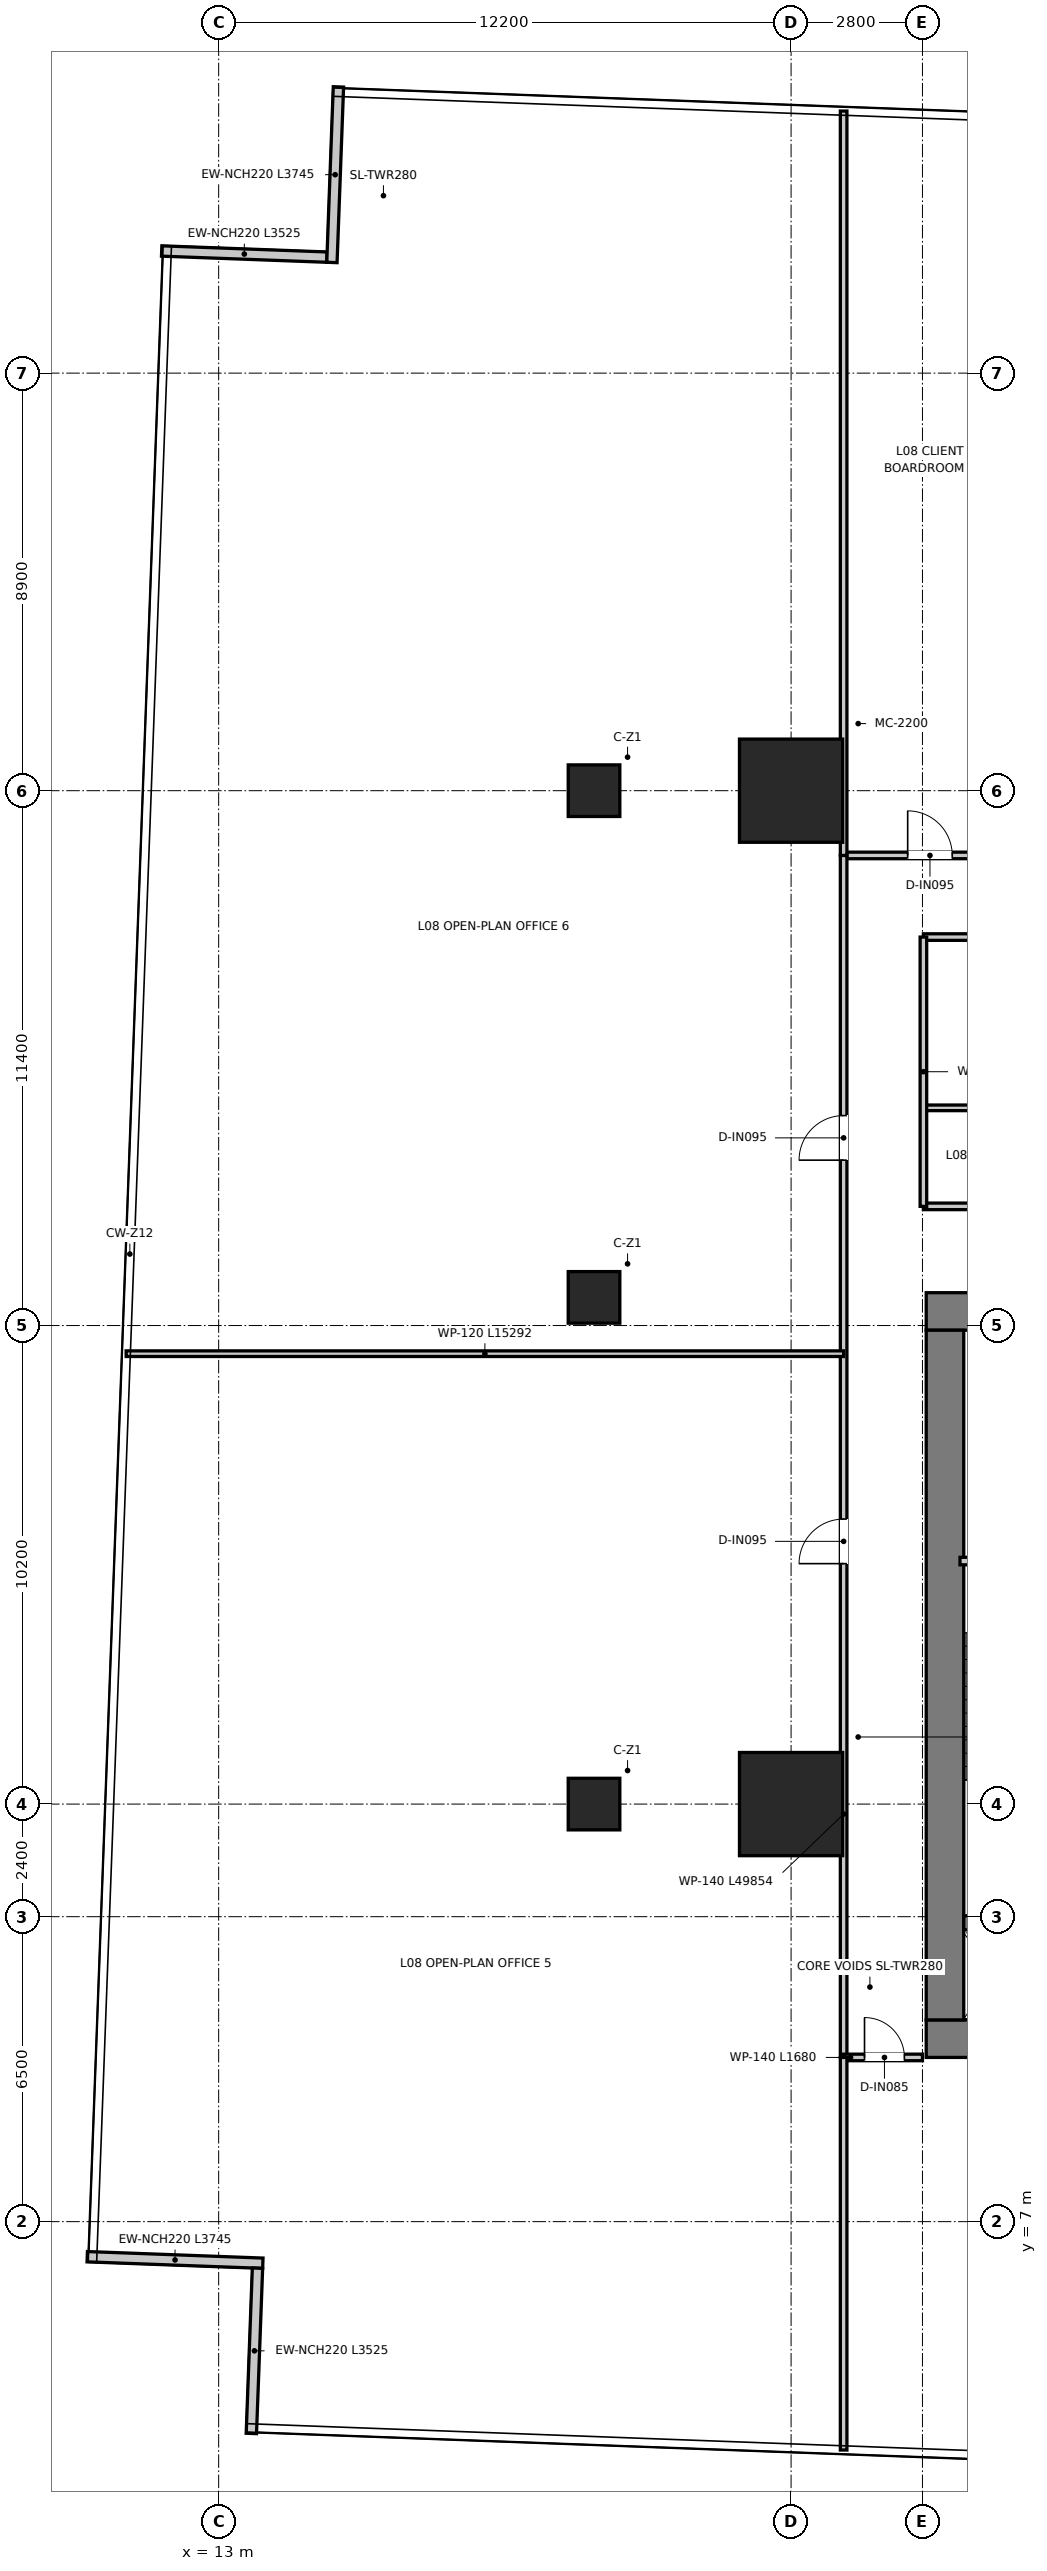
"""IFC4 building model, lengths in metres.
Left out: names, types, materials, properties, quantities, classifications, styles, units other than length and angle.
Written with IfcOpenShell. Run it as: python <this file> out.ifc"""

import sys

from ifc_helpers import new_model, si_unit, direction, frame, frame_2d, origin, origin_2d, place, context, subcontext, project, spatial, rectangle, extrude, source, transform, mapped, element, fill, save


model = new_model("IFC4")
c1 = context("Model", 3, precision=1e-05, world=origin(), true_north=direction((0.0, 1.0)))
c2 = subcontext(c1, "Body", "Model", "MODEL_VIEW")
j1 = project(units=[si_unit("LENGTHUNIT", "METRE"), si_unit("PLANEANGLEUNIT", "RADIAN")], contexts=[c1])
p1 = place(None, origin())
s1 = spatial("IfcSite", under=j1, at=p1, CompositionType="ELEMENT")
p2 = place(p1, origin())
s2 = spatial("IfcBuilding", under=s1, at=p2, CompositionType="ELEMENT")
p3 = place(p2, frame((0.0, 0.0, 36.85)))
s3 = spatial("IfcBuildingStorey", under=s2, at=p3, CompositionType="ELEMENT", Elevation=36.85)
p4 = place(p3, frame((28.08, 10.9, 0.0), z_axis=(0.0, 0.0, 1.0), x_axis=(1.0, 0.0, 0.0)))
e1 = element("IfcWall", 1, at=p4, inside=s3, PredefinedType="SHEAR", context=c2, shape_type="SweptSolid", body=[
    extrude(rectangle(XDim=15.84, YDim=0.8, at=frame_2d((7.92, 0.0))), origin(), (0.0, 0.0, 1.0), 3.95),
])
p5 = place(p3, frame((28.08, 26.4, 0.0), z_axis=(0.0, 0.0, 1.0), x_axis=(1.0, 0.0, 0.0)))
e2 = element("IfcWall", 2, at=p5, inside=s3, PredefinedType="SHEAR", context=c2, shape_type="SweptSolid", body=[
    extrude(rectangle(XDim=15.84, YDim=0.8, at=frame_2d((7.92, 0.0))), origin(), (0.0, 0.0, 1.0), 3.95),
])
p6 = place(p5, frame((7.22, 0.0, 0.0)))
e3 = element("IfcOpeningElement", 3, at=p6, cuts=e2, PredefinedType="OPENING", context=c2, shape_type="SweptSolid", body=[
    extrude(rectangle(XDim=1.4, YDim=2.2, at=frame_2d((0.7, 1.1))), frame((0.0, 0.41, 0.0), z_axis=(0.0, -1.0, 0.0), x_axis=(1.0, 0.0, 0.0)), (0.0, 0.0, 1.0), 0.82),
])
p7 = place(p5, frame((1.775, 0.0, 0.0)))
e4 = element("IfcOpeningElement", 4, at=p7, cuts=e2, PredefinedType="OPENING", context=c2, shape_type="SweptSolid", body=[
    extrude(rectangle(XDim=1.05, YDim=2.1, at=frame_2d((0.525, 1.05))), frame((0.0, 0.41, 0.0), z_axis=(0.0, -1.0, 0.0), x_axis=(1.0, 0.0, 0.0)), (0.0, 0.0, 1.0), 0.82),
])
p8 = place(p5, frame((13.015, 0.0, 0.0)))
e5 = element("IfcOpeningElement", 5, at=p8, cuts=e2, PredefinedType="OPENING", context=c2, shape_type="SweptSolid", body=[
    extrude(rectangle(XDim=1.05, YDim=2.1, at=frame_2d((0.525, 1.05))), frame((0.0, 0.41, 0.0), z_axis=(0.0, -1.0, 0.0), x_axis=(1.0, 0.0, 0.0)), (0.0, 0.0, 1.0), 0.82),
])
p9 = place(p3, frame((28.48, 11.3, 0.0), z_axis=(0.0, 0.0, 1.0), x_axis=(0.0, 1.0, 0.0)))
e6 = element("IfcWall", 6, at=p9, inside=s3, PredefinedType="SHEAR", context=c2, shape_type="SweptSolid", body=[
    extrude(rectangle(XDim=14.7, YDim=0.8, at=frame_2d((7.35, 0.0))), origin(), (0.0, 0.0, 1.0), 3.95),
])
p10 = place(p3, frame((28.88, 13.37, 0.0), z_axis=(0.0, 0.0, 1.0), x_axis=(1.0, 0.0, 0.0)))
e7 = element("IfcWall", 7, at=p10, inside=s3, PredefinedType="SHEAR", context=c2, shape_type="SweptSolid", body=[
    extrude(rectangle(XDim=3.1, YDim=0.3, at=frame_2d((1.55, 0.0))), origin(), (0.0, 0.0, 1.0), 3.95),
])
m1 = source(origin(), c2, "Body", "SweptSolid", [
    extrude(rectangle(XDim=2.2, YDim=2.2, at=origin_2d()), origin(), (0.0, 0.0, 1.0), 3.95),
])
for number, where, z_axis, x_axis in (
    (8, (25.2, 15.9, 0.0), (0.0, 0.0, 1.0), (1.0, 0.0, 0.0)),
    (9, (25.2, 37.5, 0.0), (0.0, 0.0, 1.0), (1.0, 0.0, 0.0)),
):
    element("IfcColumn", number, at=place(p3, frame(where, z_axis=z_axis, x_axis=x_axis)), inside=s3, PredefinedType="USERDEFINED", context=c2, shape_type="MappedRepresentation", body=[
        mapped(m1, transform((0.0, 0.0, 0.0), x_axis=(1.0, 0.0, 0.0), y_axis=(0.0, 1.0, 0.0), z_axis=(0.0, 0.0, 1.0), scale=1.0)),
    ])
m2 = source(origin(), c2, "Body", "SweptSolid", [
    extrude(rectangle(XDim=1.1, YDim=1.1, at=origin_2d()), origin(), (0.0, 0.0, 1.0), 3.95),
])
for number, where, z_axis, x_axis in (
    (10, (21.0, 15.9, 0.0), (0.0, 0.0, 1.0), (1.0, 0.0, 0.0)),
    (11, (21.0, 26.7, 0.0), (0.0, 0.0, 1.0), (1.0, 0.0, 0.0)),
    (12, (21.0, 37.5, 0.0), (0.0, 0.0, 1.0), (1.0, 0.0, 0.0)),
):
    element("IfcColumn", number, at=place(p3, frame(where, z_axis=z_axis, x_axis=x_axis)), inside=s3, PredefinedType="COLUMN", context=c2, shape_type="MappedRepresentation", body=[
        mapped(m2, transform((0.0, 0.0, 0.0), x_axis=(1.0, 0.0, 0.0), y_axis=(0.0, 1.0, 0.0), z_axis=(0.0, 0.0, 1.0), scale=1.0)),
    ])
p11 = place(p3, frame((15.308, 48.873, 0.0), z_axis=(0.0, 0.0, 1.0), x_axis=(-0.999313219865, 0.03705521019, 0.0)))
e13 = element("IfcWall", 13, at=p11, inside=s3, PredefinedType="ELEMENTEDWALL", context=c2, shape_type="SweptSolid", body=[
    extrude(rectangle(XDim=3.525, YDim=0.22, at=frame_2d((1.762, 0.0))), origin(), (0.0, 0.0, 1.0), 3.67),
])
p12 = place(p3, frame((10.199, 6.253, 0.0), z_axis=(0.0, 0.0, 1.0), x_axis=(0.999311794114, -0.037093640215, 0.0)))
e14 = element("IfcWall", 14, at=p12, inside=s3, PredefinedType="ELEMENTEDWALL", context=c2, shape_type="SweptSolid", body=[
    extrude(rectangle(XDim=3.745, YDim=0.22, at=frame_2d((1.873, 0.0))), origin(), (0.0, 0.0, 1.0), 3.67),
])
p13 = place(p3, frame((13.827, 6.008, 0.0), z_axis=(0.0, 0.0, 1.0), x_axis=(-0.03705521019, -0.999313219865, 0.0)))
e15 = element("IfcWall", 15, at=p13, inside=s3, PredefinedType="ELEMENTEDWALL", context=c2, shape_type="SweptSolid", body=[
    extrude(rectangle(XDim=3.525, YDim=0.22, at=frame_2d((1.762, 0.0))), origin(), (0.0, 0.0, 1.0), 3.67),
])
p14 = place(p3, frame((15.553, 52.501, 0.0), z_axis=(0.0, 0.0, 1.0), x_axis=(-0.037093640215, -0.999311794114, 0.0)))
e16 = element("IfcWall", 16, at=p14, inside=s3, PredefinedType="ELEMENTEDWALL", context=c2, shape_type="SweptSolid", body=[
    extrude(rectangle(XDim=3.745, YDim=0.22, at=frame_2d((1.873, 0.0))), origin(), (0.0, 0.0, 1.0), 3.67),
])
p15 = place(p3, frame((28.8, 21.08, 0.0), z_axis=(0.0, 0.0, 1.0), x_axis=(1.0, 0.0, 0.0)))
e17 = element("IfcWall", 17, at=p15, inside=s3, PredefinedType="PARTITIONING", context=c2, shape_type="SweptSolid", body=[
    extrude(rectangle(XDim=3.16, YDim=0.16, at=frame_2d((1.58, 0.0))), origin(), (0.0, 0.0, 1.0), 3.67),
])
p16 = place(p15, frame((1.055, 0.0, 0.0)))
e18 = element("IfcOpeningElement", 18, at=p16, cuts=e17, PredefinedType="OPENING", context=c2, shape_type="SweptSolid", body=[
    extrude(rectangle(XDim=1.05, YDim=2.1, at=frame_2d((0.525, 1.05))), frame((0.0, 0.09, 0.0), z_axis=(0.0, -1.0, 0.0), x_axis=(1.0, 0.0, 0.0)), (0.0, 0.0, 1.0), 0.18),
])
p17 = place(p3, frame((28.02, 28.64, 0.0), z_axis=(0.0, 0.0, 1.0), x_axis=(1.0, 0.0, 0.0)))
e19 = element("IfcWall", 19, at=p17, inside=s3, PredefinedType="PARTITIONING", context=c2, shape_type="SweptSolid", body=[
    extrude(rectangle(XDim=15.96, YDim=0.14, at=frame_2d((7.98, 0.0))), origin(), (0.0, 0.0, 1.0), 3.08),
])
p18 = place(p17, frame((7.455, 0.0, 0.0)))
e20 = element("IfcOpeningElement", 20, at=p18, cuts=e19, PredefinedType="OPENING", context=c2, shape_type="SweptSolid", body=[
    extrude(rectangle(XDim=1.05, YDim=2.15, at=frame_2d((0.525, 1.075))), frame((0.0, 0.08, 0.0), z_axis=(0.0, -1.0, 0.0), x_axis=(1.0, 0.0, 0.0)), (0.0, 0.0, 1.0), 0.16),
])
p19 = place(p3, frame((28.02, 30.74, 0.0), z_axis=(0.0, 0.0, 1.0), x_axis=(1.0, 0.0, 0.0)))
e21 = element("IfcWall", 21, at=p19, inside=s3, PredefinedType="PARTITIONING", context=c2, shape_type="SweptSolid", body=[
    extrude(rectangle(XDim=15.96, YDim=0.12, at=frame_2d((7.98, 0.0))), origin(), (0.0, 0.0, 1.0), 3.08),
])
p20 = place(p3, frame((28.02, 34.38, 0.0), z_axis=(0.0, 0.0, 1.0), x_axis=(1.0, 0.0, 0.0)))
e22 = element("IfcWall", 22, at=p20, inside=s3, PredefinedType="PARTITIONING", context=c2, shape_type="SweptSolid", body=[
    extrude(rectangle(XDim=15.96, YDim=0.14, at=frame_2d((7.98, 0.0))), origin(), (0.0, 0.0, 1.0), 3.08),
])
p21 = place(p20, frame((7.83, 0.0, 0.0)))
e23 = element("IfcOpeningElement", 23, at=p21, cuts=e22, PredefinedType="OPENING", context=c2, shape_type="SweptSolid", body=[
    extrude(rectangle(XDim=0.9, YDim=2.1, at=frame_2d((0.45, 1.05))), frame((0.0, 0.08, 0.0), z_axis=(0.0, -1.0, 0.0), x_axis=(1.0, 0.0, 0.0)), (0.0, 0.0, 1.0), 0.16),
])
p22 = place(p20, frame((11.03, 0.0, 0.0)))
e24 = element("IfcOpeningElement", 24, at=p22, cuts=e22, PredefinedType="OPENING", context=c2, shape_type="SweptSolid", body=[
    extrude(rectangle(XDim=0.9, YDim=2.1, at=frame_2d((0.45, 1.05))), frame((0.0, 0.08, 0.0), z_axis=(0.0, -1.0, 0.0), x_axis=(1.0, 0.0, 0.0)), (0.0, 0.0, 1.0), 0.16),
])
p23 = place(p20, frame((14.055, 0.0, 0.0)))
e25 = element("IfcOpeningElement", 25, at=p23, cuts=e22, PredefinedType="OPENING", context=c2, shape_type="SweptSolid", body=[
    extrude(rectangle(XDim=0.95, YDim=2.1, at=frame_2d((0.475, 1.05))), frame((0.0, 0.08, 0.0), z_axis=(0.0, -1.0, 0.0), x_axis=(1.0, 0.0, 0.0)), (0.0, 0.0, 1.0), 0.16),
])
p24 = place(p20, frame((2.855, 0.0, 0.0)))
e26 = element("IfcOpeningElement", 26, at=p24, cuts=e22, PredefinedType="OPENING", context=c2, shape_type="SweptSolid", body=[
    extrude(rectangle(XDim=0.95, YDim=2.1, at=frame_2d((0.475, 1.05))), frame((0.0, 0.08, 0.0), z_axis=(0.0, -1.0, 0.0), x_axis=(1.0, 0.0, 0.0)), (0.0, 0.0, 1.0), 0.16),
])
p25 = place(p3, frame((28.02, 28.64, 0.0), z_axis=(0.0, 0.0, 1.0), x_axis=(0.0, 1.0, 0.0)))
e27 = element("IfcWall", 27, at=p25, inside=s3, PredefinedType="PARTITIONING", context=c2, shape_type="SweptSolid", body=[
    extrude(rectangle(XDim=5.74, YDim=0.14, at=frame_2d((2.87, 0.0))), origin(), (0.0, 0.0, 1.0), 3.22),
])
p26 = place(p3, frame((26.32, 36.12, 0.0), z_axis=(0.0, 0.0, 1.0), x_axis=(1.0, 0.0, 0.0)))
e28 = element("IfcWall", 28, at=p26, inside=s3, PredefinedType="PARTITIONING", context=c2, shape_type="SweptSolid", body=[
    extrude(rectangle(XDim=19.36, YDim=0.14, at=frame_2d((9.68, 0.0))), origin(), (0.0, 0.0, 1.0), 3.08),
])
p27 = place(p26, frame((1.365, 0.0, 0.0)))
e29 = element("IfcOpeningElement", 29, at=p27, cuts=e28, PredefinedType="OPENING", context=c2, shape_type="SweptSolid", body=[
    extrude(rectangle(XDim=0.95, YDim=2.1, at=frame_2d((0.475, 1.05))), frame((0.0, 0.08, 0.0), z_axis=(0.0, -1.0, 0.0), x_axis=(1.0, 0.0, 0.0)), (0.0, 0.0, 1.0), 0.16),
])
p28 = place(p26, frame((6.205, 0.0, 0.0)))
e30 = element("IfcOpeningElement", 30, at=p28, cuts=e28, PredefinedType="OPENING", context=c2, shape_type="SweptSolid", body=[
    extrude(rectangle(XDim=0.95, YDim=2.1, at=frame_2d((0.475, 1.05))), frame((0.0, 0.08, 0.0), z_axis=(0.0, -1.0, 0.0), x_axis=(1.0, 0.0, 0.0)), (0.0, 0.0, 1.0), 0.16),
])
p29 = place(p26, frame((12.205, 0.0, 0.0)))
e31 = element("IfcOpeningElement", 31, at=p29, cuts=e28, PredefinedType="OPENING", context=c2, shape_type="SweptSolid", body=[
    extrude(rectangle(XDim=0.95, YDim=2.1, at=frame_2d((0.475, 1.05))), frame((0.0, 0.08, 0.0), z_axis=(0.0, -1.0, 0.0), x_axis=(1.0, 0.0, 0.0)), (0.0, 0.0, 1.0), 0.16),
])
p30 = place(p26, frame((17.045, 0.0, 0.0)))
e32 = element("IfcOpeningElement", 32, at=p30, cuts=e28, PredefinedType="OPENING", context=c2, shape_type="SweptSolid", body=[
    extrude(rectangle(XDim=0.95, YDim=2.1, at=frame_2d((0.475, 1.05))), frame((0.0, 0.08, 0.0), z_axis=(0.0, -1.0, 0.0), x_axis=(1.0, 0.0, 0.0)), (0.0, 0.0, 1.0), 0.16),
])
p31 = place(p3, frame((26.32, 10.5, 0.0), z_axis=(0.0, 0.0, 1.0), x_axis=(0.0, 1.0, 0.0)))
e33 = element("IfcWall", 33, at=p31, inside=s3, PredefinedType="PARTITIONING", context=c2, shape_type="SweptSolid", body=[
    extrude(rectangle(XDim=25.62, YDim=0.14, at=frame_2d((12.81, 0.0))), origin(), (0.0, 0.0, 1.0), 2.97),
])
p32 = place(p31, frame((10.525, 0.0, 0.0)))
e34 = element("IfcOpeningElement", 34, at=p32, cuts=e33, PredefinedType="OPENING", context=c2, shape_type="SweptSolid", body=[
    extrude(rectangle(XDim=0.95, YDim=2.1, at=frame_2d((0.475, 1.05))), frame((0.0, 0.08, 0.0), z_axis=(0.0, -1.0, 0.0), x_axis=(1.0, 0.0, 0.0)), (0.0, 0.0, 1.0), 0.16),
])
p33 = place(p31, frame((19.125, 0.0, 0.0)))
e35 = element("IfcOpeningElement", 35, at=p33, cuts=e33, PredefinedType="OPENING", context=c2, shape_type="SweptSolid", body=[
    extrude(rectangle(XDim=0.95, YDim=2.1, at=frame_2d((0.475, 1.05))), frame((0.0, 0.08, 0.0), z_axis=(0.0, -1.0, 0.0), x_axis=(1.0, 0.0, 0.0)), (0.0, 0.0, 1.0), 0.16),
])
p34 = place(p3, frame((26.32, 10.5, 0.0), z_axis=(0.0, 0.0, 1.0), x_axis=(1.0, 0.0, 0.0)))
e36 = element("IfcWall", 36, at=p34, inside=s3, PredefinedType="PARTITIONING", context=c2, shape_type="SweptSolid", body=[
    extrude(rectangle(XDim=1.68, YDim=0.14, at=frame_2d((0.84, 0.0))), origin(), (0.0, 0.0, 1.0), 3.67),
])
p35 = place(p34, frame((0.445, 0.0, 0.0)))
e37 = element("IfcOpeningElement", 37, at=p35, cuts=e36, PredefinedType="OPENING", context=c2, shape_type="SweptSolid", body=[
    extrude(rectangle(XDim=0.85, YDim=2.1, at=frame_2d((0.425, 1.05))), frame((0.0, 0.08, 0.0), z_axis=(0.0, -1.0, 0.0), x_axis=(1.0, 0.0, 0.0)), (0.0, 0.0, 1.0), 0.16),
])
p36 = place(p3, frame((26.32, 36.12, 0.0), z_axis=(0.0, 0.0, 1.0), x_axis=(0.0, 1.0, 0.0)))
e38 = element("IfcWall", 38, at=p36, inside=s3, PredefinedType="PARTITIONING", context=c2, shape_type="SweptSolid", body=[
    extrude(rectangle(XDim=15.866, YDim=0.14, at=frame_2d((7.933, 0.0))), origin(), (0.0, 0.0, 1.0), 2.97),
])
p37 = place(p3, frame((26.32, 2.132, 0.0), z_axis=(0.0, 0.0, 1.0), x_axis=(0.0, 1.0, 0.0)))
e39 = element("IfcWall", 39, at=p37, inside=s3, PredefinedType="PARTITIONING", context=c2, shape_type="SweptSolid", body=[
    extrude(rectangle(XDim=8.368, YDim=0.14, at=frame_2d((4.184, 0.0))), origin(), (0.0, 0.0, 1.0), 3.67),
])
p38 = place(p3, frame((11.028, 25.5, 0.0), z_axis=(0.0, 0.0, 1.0), x_axis=(1.0, 0.0, 0.0)))
e40 = element("IfcWall", 40, at=p38, inside=s3, PredefinedType="PARTITIONING", context=c2, shape_type="SweptSolid", body=[
    extrude(rectangle(XDim=15.292, YDim=0.12, at=frame_2d((7.646, 0.0))), origin(), (0.0, 0.0, 1.0), 2.97),
])
p39 = place(p27, origin())
e41 = element("IfcDoor", 41, at=p39, inside=s3, OperationType="SINGLE_SWING_LEFT", PredefinedType="DOOR", context=c2, shape_type="SweptSolid", body=[
    extrude(rectangle(XDim=0.95, YDim=2.1, at=frame_2d((0.475, 1.05))), frame((0.0, 0.025, 0.0), z_axis=(0.0, -1.0, 0.0), x_axis=(1.0, 0.0, 0.0)), (0.0, 0.0, 1.0), 0.05),
])
fill(e29, e41)
p40 = place(p32, origin())
e42 = element("IfcDoor", 42, at=p40, inside=s3, OperationType="SINGLE_SWING_LEFT", PredefinedType="DOOR", context=c2, shape_type="SweptSolid", body=[
    extrude(rectangle(XDim=0.95, YDim=2.1, at=frame_2d((0.475, 1.05))), frame((0.0, 0.025, 0.0), z_axis=(0.0, -1.0, 0.0), x_axis=(1.0, 0.0, 0.0)), (0.0, 0.0, 1.0), 0.05),
])
fill(e34, e42)
p41 = place(p33, origin())
e43 = element("IfcDoor", 43, at=p41, inside=s3, OperationType="SINGLE_SWING_LEFT", PredefinedType="DOOR", context=c2, shape_type="SweptSolid", body=[
    extrude(rectangle(XDim=0.95, YDim=2.1, at=frame_2d((0.475, 1.05))), frame((0.0, 0.025, 0.0), z_axis=(0.0, -1.0, 0.0), x_axis=(1.0, 0.0, 0.0)), (0.0, 0.0, 1.0), 0.05),
])
fill(e35, e43)
p42 = place(p35, origin())
e44 = element("IfcDoor", 44, at=p42, inside=s3, OperationType="SINGLE_SWING_LEFT", PredefinedType="DOOR", context=c2, shape_type="SweptSolid", body=[
    extrude(rectangle(XDim=0.85, YDim=2.1, at=frame_2d((0.425, 1.05))), frame((0.0, 0.025, 0.0), z_axis=(0.0, -1.0, 0.0), x_axis=(1.0, 0.0, 0.0)), (0.0, 0.0, 1.0), 0.05),
])
fill(e37, e44)
save(model, sys.argv[1])
